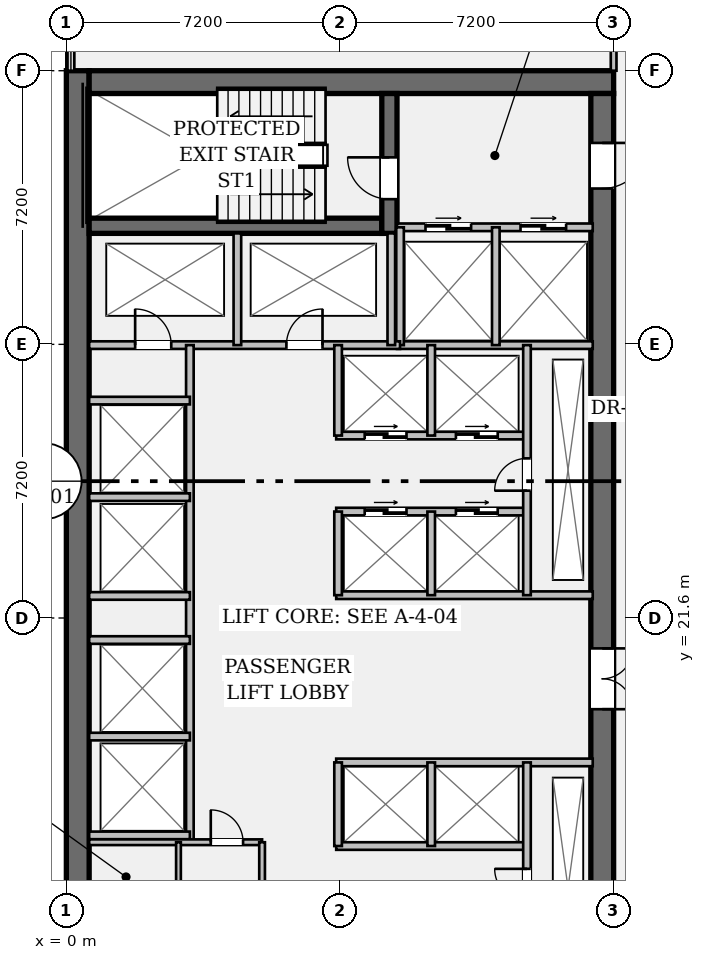
"""IFC4 building model, lengths in metres.
Left out: names, types, materials, properties, quantities, classifications, styles, units other than length and angle.
Written with IfcOpenShell. Run it as: python <this file> out.ifc"""

import sys

from ifc_helpers import new_model, si_unit, direction, frame, frame_2d, origin, place, context, subcontext, project, spatial, rectangle, extrude, element, fill, save


model = new_model("IFC4")
c1 = context("Model", 3, precision=1e-05, world=origin(), true_north=direction((0.0, 1.0)))
c2 = subcontext(c1, "Body", "Model", "MODEL_VIEW")
j1 = project(units=[si_unit("LENGTHUNIT", "METRE"), si_unit("PLANEANGLEUNIT", "RADIAN")], contexts=[c1])
p1 = place(None, origin())
s1 = spatial("IfcSite", under=j1, at=p1, CompositionType="ELEMENT")
p2 = place(p1, origin())
s2 = spatial("IfcBuilding", under=s1, at=p2, CompositionType="ELEMENT")
p3 = place(p2, frame((0.0, 0.0, 46.55)))
s3 = spatial("IfcBuildingStorey", under=s2, at=p3, CompositionType="ELEMENT", Elevation=46.55)
p4 = place(p3, frame((0.3, 7.2, 0.0), z_axis=(0.0, 0.0, 1.0), x_axis=(0.0, 1.0, 0.0)))
e1 = element("IfcWall", 1, at=p4, inside=s3, PredefinedType="SHEAR", context=c2, shape_type="SweptSolid", body=[
    extrude(rectangle(XDim=28.8, YDim=0.6, at=frame_2d((14.4, 0.0))), origin(), (0.0, 0.0, 1.0), 3.57),
])
p5 = place(p3, frame((0.6, 35.7, 0.0), z_axis=(0.0, 0.0, 1.0), x_axis=(1.0, 0.0, 0.0)))
e2 = element("IfcWall", 2, at=p5, inside=s3, PredefinedType="SHEAR", context=c2, shape_type="SweptSolid", body=[
    extrude(rectangle(XDim=13.8, YDim=0.6, at=frame_2d((6.9, 0.0))), origin(), (0.0, 0.0, 1.0), 3.57),
])
p6 = place(p3, frame((14.1, 35.4, 0.0), z_axis=(0.0, 0.0, 1.0), x_axis=(0.0, -1.0, 0.0)))
e3 = element("IfcWall", 3, at=p6, inside=s3, PredefinedType="SHEAR", context=c2, shape_type="SweptSolid", body=[
    extrude(rectangle(XDim=27.6, YDim=0.6, at=frame_2d((13.8, 0.0))), origin(), (0.0, 0.0, 1.0), 3.57),
])
p7 = place(p6, frame((1.3, 0.0, 0.0)))
e4 = element("IfcOpeningElement", 4, at=p7, cuts=e3, PredefinedType="OPENING", context=c2, shape_type="SweptSolid", body=[
    extrude(rectangle(XDim=1.2, YDim=2.15, at=frame_2d((0.6, 1.075))), frame((0.0, 0.312, 0.0), z_axis=(0.0, -1.0, 0.0), x_axis=(1.0, 0.0, 0.0)), (0.0, 0.0, 1.0), 0.624),
])
p8 = place(p6, frame((25.25, 0.0, 0.0)))
e5 = element("IfcOpeningElement", 5, at=p8, cuts=e3, PredefinedType="OPENING", context=c2, shape_type="SweptSolid", body=[
    extrude(rectangle(XDim=1.2, YDim=2.15, at=frame_2d((0.6, 1.075))), frame((0.0, 0.312, 0.0), z_axis=(0.0, -1.0, 0.0), x_axis=(1.0, 0.0, 0.0)), (0.0, 0.0, 1.0), 0.624),
])
p9 = place(p6, frame((14.6, 0.0, 0.0)))
e6 = element("IfcOpeningElement", 6, at=p9, cuts=e3, PredefinedType="OPENING", context=c2, shape_type="SweptSolid", body=[
    extrude(rectangle(XDim=1.6, YDim=2.2, at=frame_2d((0.8, 1.1))), frame((0.0, 0.312, 0.0), z_axis=(0.0, -1.0, 0.0), x_axis=(1.0, 0.0, 0.0)), (0.0, 0.0, 1.0), 0.624),
])
p10 = place(p3, frame((0.6, 31.92, 0.0), z_axis=(0.0, 0.0, 1.0), x_axis=(1.0, 0.0, 0.0)))
e7 = element("IfcWall", 7, at=p10, inside=s3, PredefinedType="SHEAR", context=c2, shape_type="SweptSolid", body=[
    extrude(rectangle(XDim=7.7, YDim=0.4, at=frame_2d((3.85, 0.0))), origin(), (0.0, 0.0, 1.0), 3.57),
])
p11 = place(p3, frame((8.5, 31.72, 0.0), z_axis=(0.0, 0.0, 1.0), x_axis=(0.0, 1.0, 0.0)))
e8 = element("IfcWall", 8, at=p11, inside=s3, PredefinedType="SHEAR", context=c2, shape_type="SweptSolid", body=[
    extrude(rectangle(XDim=3.68, YDim=0.4, at=frame_2d((1.84, 0.0))), origin(), (0.0, 0.0, 1.0), 3.57),
])
p12 = place(p11, frame((0.9, 0.0, 0.0)))
e9 = element("IfcOpeningElement", 9, at=p12, cuts=e8, PredefinedType="OPENING", context=c2, shape_type="SweptSolid", body=[
    extrude(rectangle(XDim=1.1, YDim=2.15, at=frame_2d((0.55, 1.075))), frame((0.0, 0.212, 0.0), z_axis=(0.0, -1.0, 0.0), x_axis=(1.0, 0.0, 0.0)), (0.0, 0.0, 1.0), 0.424),
])
p13 = place(p3, frame((8.7, 31.88, 0.0), z_axis=(0.0, 0.0, 1.0), x_axis=(1.0, 0.0, 0.0)))
e10 = element("IfcWall", 10, at=p13, inside=s3, PredefinedType="PARTITIONING", context=c2, shape_type="SweptSolid", body=[
    extrude(rectangle(XDim=5.15, YDim=0.2, at=frame_2d((2.575, 0.0))), origin(), (0.0, 0.0, 1.0), 3.57),
])
p14 = place(p13, frame((0.75, 0.0, 0.0)))
e11 = element("IfcOpeningElement", 11, at=p14, cuts=e10, PredefinedType="OPENING", context=c2, shape_type="SweptSolid", body=[
    extrude(rectangle(XDim=1.2, YDim=2.2, at=frame_2d((0.6, 1.1))), frame((0.0, 0.112, 0.0), z_axis=(0.0, -1.0, 0.0), x_axis=(1.0, 0.0, 0.0)), (0.0, 0.0, 1.0), 0.224),
])
p15 = place(p13, frame((3.25, 0.0, 0.0)))
e12 = element("IfcOpeningElement", 12, at=p15, cuts=e10, PredefinedType="OPENING", context=c2, shape_type="SweptSolid", body=[
    extrude(rectangle(XDim=1.2, YDim=2.2, at=frame_2d((0.6, 1.1))), frame((0.0, 0.112, 0.0), z_axis=(0.0, -1.0, 0.0), x_axis=(1.0, 0.0, 0.0)), (0.0, 0.0, 1.0), 0.224),
])
p16 = place(p3, frame((8.7, 28.78, 0.0), z_axis=(0.0, 0.0, 1.0), x_axis=(1.0, 0.0, 0.0)))
e13 = element("IfcWall", 13, at=p16, inside=s3, PredefinedType="PARTITIONING", context=c2, shape_type="SweptSolid", body=[
    extrude(rectangle(XDim=5.15, YDim=0.2, at=frame_2d((2.575, 0.0))), origin(), (0.0, 0.0, 1.0), 3.57),
])
for number, where, z_axis, x_axis in (
    (14, (8.78, 28.78, 0.0), (0.0, 0.0, 1.0), (0.0, 1.0, 0.0)),
    (15, (11.3, 28.78, 0.0), (0.0, 0.0, 1.0), (0.0, 1.0, 0.0)),
):
    element("IfcWall", number, at=place(p3, frame(where, z_axis=z_axis, x_axis=x_axis)), inside=s3, PredefinedType="PARTITIONING", context=c2, shape_type="SweptSolid", body=[
        extrude(rectangle(XDim=3.1, YDim=0.2, at=frame_2d((1.55, 0.0))), origin(), (0.0, 0.0, 1.0), 3.57),
    ])
p17 = place(p3, frame((0.6, 28.78, 0.0), z_axis=(0.0, 0.0, 1.0), x_axis=(1.0, 0.0, 0.0)))
e16 = element("IfcWall", 16, at=p17, inside=s3, PredefinedType="PARTITIONING", context=c2, shape_type="SweptSolid", body=[
    extrude(rectangle(XDim=8.18, YDim=0.2, at=frame_2d((4.09, 0.0))), origin(), (0.0, 0.0, 1.0), 3.57),
])
p18 = place(p17, frame((1.21, 0.0, 0.0)))
e17 = element("IfcOpeningElement", 17, at=p18, cuts=e16, PredefinedType="OPENING", context=c2, shape_type="SweptSolid", body=[
    extrude(rectangle(XDim=0.95, YDim=2.15, at=frame_2d((0.475, 1.075))), frame((0.0, 0.112, 0.0), z_axis=(0.0, -1.0, 0.0), x_axis=(1.0, 0.0, 0.0)), (0.0, 0.0, 1.0), 0.224),
])
p19 = place(p17, frame((5.19, 0.0, 0.0)))
e18 = element("IfcOpeningElement", 18, at=p19, cuts=e16, PredefinedType="OPENING", context=c2, shape_type="SweptSolid", body=[
    extrude(rectangle(XDim=0.95, YDim=2.15, at=frame_2d((0.475, 1.075))), frame((0.0, 0.112, 0.0), z_axis=(0.0, -1.0, 0.0), x_axis=(1.0, 0.0, 0.0)), (0.0, 0.0, 1.0), 0.224),
])
for number, where, z_axis, x_axis in (
    (19, (4.5, 28.78, 0.0), (0.0, 0.0, 1.0), (0.0, 1.0, 0.0)),
    (20, (8.55, 28.78, 0.0), (0.0, 0.0, 1.0), (0.0, 1.0, 0.0)),
):
    element("IfcWall", number, at=place(p3, frame(where, z_axis=z_axis, x_axis=x_axis)), inside=s3, PredefinedType="PARTITIONING", context=c2, shape_type="SweptSolid", body=[
        extrude(rectangle(XDim=2.94, YDim=0.2, at=frame_2d((1.47, 0.0))), origin(), (0.0, 0.0, 1.0), 3.57),
    ])
p20 = place(p3, frame((3.25, 15.7, 0.0), z_axis=(0.0, 0.0, 1.0), x_axis=(0.0, 1.0, 0.0)))
e21 = element("IfcWall", 21, at=p20, inside=s3, PredefinedType="PARTITIONING", context=c2, shape_type="SweptSolid", body=[
    extrude(rectangle(XDim=13.08, YDim=0.2, at=frame_2d((6.54, 0.0))), origin(), (0.0, 0.0, 1.0), 3.57),
])
for number, where, z_axis, x_axis in (
    (22, (0.6, 15.88, 0.0), (0.0, 0.0, 1.0), (1.0, 0.0, 0.0)),
    (23, (0.6, 18.48, 0.0), (0.0, 0.0, 1.0), (1.0, 0.0, 0.0)),
    (24, (0.6, 22.18, 0.0), (0.0, 0.0, 1.0), (1.0, 0.0, 0.0)),
    (25, (0.6, 24.78, 0.0), (0.0, 0.0, 1.0), (1.0, 0.0, 0.0)),
    (26, (0.6, 21.02, 0.0), (0.0, 0.0, 1.0), (1.0, 0.0, 0.0)),
    (27, (0.6, 27.32, 0.0), (0.0, 0.0, 1.0), (1.0, 0.0, 0.0)),
):
    element("IfcWall", number, at=place(p3, frame(where, z_axis=z_axis, x_axis=x_axis)), inside=s3, PredefinedType="PARTITIONING", context=c2, shape_type="SweptSolid", body=[
        extrude(rectangle(XDim=2.65, YDim=0.2, at=frame_2d((1.325, 0.0))), origin(), (0.0, 0.0, 1.0), 3.57),
    ])
p21 = place(p3, frame((7.1, 22.2, 0.0), z_axis=(0.0, 0.0, 1.0), x_axis=(1.0, 0.0, 0.0)))
e28 = element("IfcWall", 28, at=p21, inside=s3, PredefinedType="PARTITIONING", context=c2, shape_type="SweptSolid", body=[
    extrude(rectangle(XDim=6.75, YDim=0.2, at=frame_2d((3.375, 0.0))), origin(), (0.0, 0.0, 1.0), 3.57),
])
p22 = place(p3, frame((7.1, 24.4, 0.0), z_axis=(0.0, 0.0, 1.0), x_axis=(1.0, 0.0, 0.0)))
e29 = element("IfcWall", 29, at=p22, inside=s3, PredefinedType="PARTITIONING", context=c2, shape_type="SweptSolid", body=[
    extrude(rectangle(XDim=5.02, YDim=0.2, at=frame_2d((2.51, 0.0))), origin(), (0.0, 0.0, 1.0), 3.57),
])
p23 = place(p22, frame((0.75, 0.0, 0.0)))
e30 = element("IfcOpeningElement", 30, at=p23, cuts=e29, PredefinedType="OPENING", context=c2, shape_type="SweptSolid", body=[
    extrude(rectangle(XDim=1.1, YDim=2.2, at=frame_2d((0.55, 1.1))), frame((0.0, 0.112, 0.0), z_axis=(0.0, -1.0, 0.0), x_axis=(1.0, 0.0, 0.0)), (0.0, 0.0, 1.0), 0.224),
])
p24 = place(p22, frame((3.15, 0.0, 0.0)))
e31 = element("IfcOpeningElement", 31, at=p24, cuts=e29, PredefinedType="OPENING", context=c2, shape_type="SweptSolid", body=[
    extrude(rectangle(XDim=1.1, YDim=2.2, at=frame_2d((0.55, 1.1))), frame((0.0, 0.112, 0.0), z_axis=(0.0, -1.0, 0.0), x_axis=(1.0, 0.0, 0.0)), (0.0, 0.0, 1.0), 0.224),
])
p25 = place(p3, frame((7.1, 26.4, 0.0), z_axis=(0.0, 0.0, 1.0), x_axis=(1.0, 0.0, 0.0)))
e32 = element("IfcWall", 32, at=p25, inside=s3, PredefinedType="PARTITIONING", context=c2, shape_type="SweptSolid", body=[
    extrude(rectangle(XDim=5.02, YDim=0.2, at=frame_2d((2.51, 0.0))), origin(), (0.0, 0.0, 1.0), 3.57),
])
p26 = place(p25, frame((0.75, 0.0, 0.0)))
e33 = element("IfcOpeningElement", 33, at=p26, cuts=e32, PredefinedType="OPENING", context=c2, shape_type="SweptSolid", body=[
    extrude(rectangle(XDim=1.1, YDim=2.2, at=frame_2d((0.55, 1.1))), frame((0.0, 0.112, 0.0), z_axis=(0.0, -1.0, 0.0), x_axis=(1.0, 0.0, 0.0)), (0.0, 0.0, 1.0), 0.224),
])
p27 = place(p25, frame((3.15, 0.0, 0.0)))
e34 = element("IfcOpeningElement", 34, at=p27, cuts=e32, PredefinedType="OPENING", context=c2, shape_type="SweptSolid", body=[
    extrude(rectangle(XDim=1.1, YDim=2.2, at=frame_2d((0.55, 1.1))), frame((0.0, 0.112, 0.0), z_axis=(0.0, -1.0, 0.0), x_axis=(1.0, 0.0, 0.0)), (0.0, 0.0, 1.0), 0.224),
])
p28 = place(p3, frame((7.15, 22.2, 0.0), z_axis=(0.0, 0.0, 1.0), x_axis=(0.0, 1.0, 0.0)))
e35 = element("IfcWall", 35, at=p28, inside=s3, PredefinedType="PARTITIONING", context=c2, shape_type="SweptSolid", body=[
    extrude(rectangle(XDim=2.2, YDim=0.2, at=frame_2d((1.1, 0.0))), origin(), (0.0, 0.0, 1.0), 3.57),
])
p29 = place(p3, frame((7.15, 26.4, 0.0), z_axis=(0.0, 0.0, 1.0), x_axis=(0.0, 1.0, 0.0)))
e36 = element("IfcWall", 36, at=p29, inside=s3, PredefinedType="PARTITIONING", context=c2, shape_type="SweptSolid", body=[
    extrude(rectangle(XDim=2.38, YDim=0.2, at=frame_2d((1.19, 0.0))), origin(), (0.0, 0.0, 1.0), 3.57),
])
p30 = place(p3, frame((9.6, 22.2, 0.0), z_axis=(0.0, 0.0, 1.0), x_axis=(0.0, 1.0, 0.0)))
e37 = element("IfcWall", 37, at=p30, inside=s3, PredefinedType="PARTITIONING", context=c2, shape_type="SweptSolid", body=[
    extrude(rectangle(XDim=2.2, YDim=0.2, at=frame_2d((1.1, 0.0))), origin(), (0.0, 0.0, 1.0), 3.57),
])
p31 = place(p3, frame((9.6, 26.4, 0.0), z_axis=(0.0, 0.0, 1.0), x_axis=(0.0, 1.0, 0.0)))
e38 = element("IfcWall", 38, at=p31, inside=s3, PredefinedType="PARTITIONING", context=c2, shape_type="SweptSolid", body=[
    extrude(rectangle(XDim=2.38, YDim=0.2, at=frame_2d((1.19, 0.0))), origin(), (0.0, 0.0, 1.0), 3.57),
])
p32 = place(p3, frame((12.12, 22.2, 0.0), z_axis=(0.0, 0.0, 1.0), x_axis=(0.0, 1.0, 0.0)))
e39 = element("IfcWall", 39, at=p32, inside=s3, PredefinedType="PARTITIONING", context=c2, shape_type="SweptSolid", body=[
    extrude(rectangle(XDim=6.58, YDim=0.2, at=frame_2d((3.29, 0.0))), origin(), (0.0, 0.0, 1.0), 3.57),
])
p33 = place(p32, frame((2.75, 0.0, 0.0)))
e40 = element("IfcOpeningElement", 40, at=p33, cuts=e39, PredefinedType="OPENING", context=c2, shape_type="SweptSolid", body=[
    extrude(rectangle(XDim=0.85, YDim=2.15, at=frame_2d((0.425, 1.075))), frame((0.0, 0.112, 0.0), z_axis=(0.0, -1.0, 0.0), x_axis=(1.0, 0.0, 0.0)), (0.0, 0.0, 1.0), 0.224),
])
p34 = place(p3, frame((7.1, 17.8, 0.0), z_axis=(0.0, 0.0, 1.0), x_axis=(1.0, 0.0, 0.0)))
e41 = element("IfcWall", 41, at=p34, inside=s3, PredefinedType="PARTITIONING", context=c2, shape_type="SweptSolid", body=[
    extrude(rectangle(XDim=6.75, YDim=0.2, at=frame_2d((3.375, 0.0))), origin(), (0.0, 0.0, 1.0), 3.57),
])
p35 = place(p3, frame((7.1, 15.6, 0.0), z_axis=(0.0, 0.0, 1.0), x_axis=(1.0, 0.0, 0.0)))
e42 = element("IfcWall", 42, at=p35, inside=s3, PredefinedType="PARTITIONING", context=c2, shape_type="SweptSolid", body=[
    extrude(rectangle(XDim=5.02, YDim=0.2, at=frame_2d((2.51, 0.0))), origin(), (0.0, 0.0, 1.0), 3.57),
])
for number, where, z_axis, x_axis in (
    (43, (7.15, 15.6, 0.0), (0.0, 0.0, 1.0), (0.0, 1.0, 0.0)),
    (44, (9.6, 15.6, 0.0), (0.0, 0.0, 1.0), (0.0, 1.0, 0.0)),
):
    element("IfcWall", number, at=place(p3, frame(where, z_axis=z_axis, x_axis=x_axis)), inside=s3, PredefinedType="PARTITIONING", context=c2, shape_type="SweptSolid", body=[
        extrude(rectangle(XDim=2.2, YDim=0.2, at=frame_2d((1.1, 0.0))), origin(), (0.0, 0.0, 1.0), 3.57),
    ])
p36 = place(p3, frame((12.12, 11.2, 0.0), z_axis=(0.0, 0.0, 1.0), x_axis=(0.0, 1.0, 0.0)))
e45 = element("IfcWall", 45, at=p36, inside=s3, PredefinedType="PARTITIONING", context=c2, shape_type="SweptSolid", body=[
    extrude(rectangle(XDim=6.6, YDim=0.2, at=frame_2d((3.3, 0.0))), origin(), (0.0, 0.0, 1.0), 3.57),
])
p37 = place(p36, frame((2.95, 0.0, 0.0)))
e46 = element("IfcOpeningElement", 46, at=p37, cuts=e45, PredefinedType="OPENING", context=c2, shape_type="SweptSolid", body=[
    extrude(rectangle(XDim=0.85, YDim=2.15, at=frame_2d((0.425, 1.075))), frame((0.0, 0.112, 0.0), z_axis=(0.0, -1.0, 0.0), x_axis=(1.0, 0.0, 0.0)), (0.0, 0.0, 1.0), 0.224),
])
p38 = place(p3, frame((0.6, 15.7, 0.0), z_axis=(0.0, 0.0, 1.0), x_axis=(1.0, 0.0, 0.0)))
e47 = element("IfcWall", 47, at=p38, inside=s3, PredefinedType="PARTITIONING", context=c2, shape_type="SweptSolid", body=[
    extrude(rectangle(XDim=4.55, YDim=0.15, at=frame_2d((2.275, 0.0))), origin(), (0.0, 0.0, 1.0), 3.57),
])
p39 = place(p38, frame((3.2, 0.0, 0.0)))
e48 = element("IfcOpeningElement", 48, at=p39, cuts=e47, PredefinedType="OPENING", context=c2, shape_type="SweptSolid", body=[
    extrude(rectangle(XDim=0.85, YDim=2.15, at=frame_2d((0.425, 1.075))), frame((0.0, 0.087, 0.0), z_axis=(0.0, -1.0, 0.0), x_axis=(1.0, 0.0, 0.0)), (0.0, 0.0, 1.0), 0.174),
])
p40 = place(p3, frame((5.15, 11.28, 0.0), z_axis=(0.0, 0.0, 1.0), x_axis=(0.0, 1.0, 0.0)))
e49 = element("IfcWall", 49, at=p40, inside=s3, PredefinedType="PARTITIONING", context=c2, shape_type="SweptSolid", body=[
    extrude(rectangle(XDim=4.42, YDim=0.15, at=frame_2d((2.21, 0.0))), origin(), (0.0, 0.0, 1.0), 3.57),
])
p41 = place(p3, frame((2.95, 11.28, 0.0), z_axis=(0.0, 0.0, 1.0), x_axis=(0.0, 1.0, 0.0)))
e50 = element("IfcWall", 50, at=p41, inside=s3, PredefinedType="PARTITIONING", context=c2, shape_type="SweptSolid", body=[
    extrude(rectangle(XDim=4.42, YDim=0.125, at=frame_2d((2.21, 0.0))), origin(), (0.0, 0.0, 1.0), 3.57),
])
p42 = place(p41, frame((1.6, 0.0, 0.0)))
e51 = element("IfcOpeningElement", 51, at=p42, cuts=e50, PredefinedType="OPENING", context=c2, shape_type="SweptSolid", body=[
    extrude(rectangle(XDim=0.85, YDim=2.15, at=frame_2d((0.425, 1.075))), frame((0.0, 0.074, 0.0), z_axis=(0.0, -1.0, 0.0), x_axis=(1.0, 0.0, 0.0)), (0.0, 0.0, 1.0), 0.149),
])
p43 = place(p3, frame((14.4, 36.0, 0.0), z_axis=(0.0, 0.0, 1.0), x_axis=(0.0, 1.0, 0.0)))
e52 = element("IfcWall", 52, at=p43, inside=s3, PredefinedType="PARTITIONING", context=c2, shape_type="SweptSolid", body=[
    extrude(rectangle(XDim=7.08, YDim=0.15, at=frame_2d((3.54, 0.0))), origin(), (0.0, 0.0, 1.0), 2.699),
])
p44 = place(p43, frame((0.65, 0.0, 0.0)))
e53 = element("IfcOpeningElement", 53, at=p44, cuts=e52, PredefinedType="OPENING", context=c2, shape_type="SweptSolid", body=[
    extrude(rectangle(XDim=0.9, YDim=2.15, at=frame_2d((0.45, 1.075))), frame((0.0, 0.087, 0.0), z_axis=(0.0, -1.0, 0.0), x_axis=(1.0, 0.0, 0.0)), (0.0, 0.0, 1.0), 0.174),
])
p45 = place(p12, origin())
e54 = element("IfcDoor", 54, at=p45, inside=s3, OperationType="SINGLE_SWING_RIGHT", PredefinedType="DOOR", context=c2, shape_type="SweptSolid", body=[
    extrude(rectangle(XDim=1.1, YDim=2.15, at=frame_2d((0.55, 1.075))), frame((0.0, 0.025, 0.0), z_axis=(0.0, -1.0, 0.0), x_axis=(1.0, 0.0, 0.0)), (0.0, 0.0, 1.0), 0.05),
])
fill(e9, e54)
p46 = place(p7, origin())
e55 = element("IfcDoor", 55, at=p46, inside=s3, OperationType="SINGLE_SWING_LEFT", PredefinedType="DOOR", context=c2, shape_type="SweptSolid", body=[
    extrude(rectangle(XDim=1.2, YDim=2.15, at=frame_2d((0.6, 1.075))), frame((0.0, 0.025, 0.0), z_axis=(0.0, -1.0, 0.0), x_axis=(1.0, 0.0, 0.0)), (0.0, 0.0, 1.0), 0.05),
])
fill(e4, e55)
p47 = place(p14, origin())
e56 = element("IfcDoor", 56, at=p47, inside=s3, OperationType="DOUBLE_DOOR_SLIDING", PredefinedType="DOOR", context=c2, shape_type="SweptSolid", body=[
    extrude(rectangle(XDim=1.2, YDim=2.2, at=frame_2d((0.6, 1.1))), frame((0.0, 0.025, 0.0), z_axis=(0.0, -1.0, 0.0), x_axis=(1.0, 0.0, 0.0)), (0.0, 0.0, 1.0), 0.05),
])
fill(e11, e56)
p48 = place(p15, origin())
e57 = element("IfcDoor", 57, at=p48, inside=s3, OperationType="DOUBLE_DOOR_SLIDING", PredefinedType="DOOR", context=c2, shape_type="SweptSolid", body=[
    extrude(rectangle(XDim=1.2, YDim=2.2, at=frame_2d((0.6, 1.1))), frame((0.0, 0.025, 0.0), z_axis=(0.0, -1.0, 0.0), x_axis=(1.0, 0.0, 0.0)), (0.0, 0.0, 1.0), 0.05),
])
fill(e12, e57)
p49 = place(p18, origin())
e58 = element("IfcDoor", 58, at=p49, inside=s3, OperationType="SINGLE_SWING_LEFT", PredefinedType="DOOR", context=c2, shape_type="SweptSolid", body=[
    extrude(rectangle(XDim=0.95, YDim=2.15, at=frame_2d((0.475, 1.075))), frame((0.0, 0.025, 0.0), z_axis=(0.0, -1.0, 0.0), x_axis=(1.0, 0.0, 0.0)), (0.0, 0.0, 1.0), 0.05),
])
fill(e17, e58)
p50 = place(p19, origin())
e59 = element("IfcDoor", 59, at=p50, inside=s3, OperationType="SINGLE_SWING_RIGHT", PredefinedType="DOOR", context=c2, shape_type="SweptSolid", body=[
    extrude(rectangle(XDim=0.95, YDim=2.15, at=frame_2d((0.475, 1.075))), frame((0.0, 0.025, 0.0), z_axis=(0.0, -1.0, 0.0), x_axis=(1.0, 0.0, 0.0)), (0.0, 0.0, 1.0), 0.05),
])
fill(e18, e59)
p51 = place(p9, origin())
e60 = element("IfcDoor", 60, at=p51, inside=s3, OperationType="DOUBLE_DOOR_SINGLE_SWING", PredefinedType="DOOR", context=c2, shape_type="SweptSolid", body=[
    extrude(rectangle(XDim=1.6, YDim=2.2, at=frame_2d((0.8, 1.1))), frame((0.0, 0.025, 0.0), z_axis=(0.0, -1.0, 0.0), x_axis=(1.0, 0.0, 0.0)), (0.0, 0.0, 1.0), 0.05),
])
fill(e6, e60)
p52 = place(p33, origin())
e61 = element("IfcDoor", 61, at=p52, inside=s3, OperationType="SINGLE_SWING_LEFT", PredefinedType="DOOR", context=c2, shape_type="SweptSolid", body=[
    extrude(rectangle(XDim=0.85, YDim=2.15, at=frame_2d((0.425, 1.075))), frame((0.0, 0.025, 0.0), z_axis=(0.0, -1.0, 0.0), x_axis=(1.0, 0.0, 0.0)), (0.0, 0.0, 1.0), 0.05),
])
fill(e40, e61)
p53 = place(p23, origin())
e62 = element("IfcDoor", 62, at=p53, inside=s3, OperationType="DOUBLE_DOOR_SLIDING", PredefinedType="DOOR", context=c2, shape_type="SweptSolid", body=[
    extrude(rectangle(XDim=1.1, YDim=2.2, at=frame_2d((0.55, 1.1))), frame((0.0, 0.025, 0.0), z_axis=(0.0, -1.0, 0.0), x_axis=(1.0, 0.0, 0.0)), (0.0, 0.0, 1.0), 0.05),
])
fill(e30, e62)
p54 = place(p24, origin())
e63 = element("IfcDoor", 63, at=p54, inside=s3, OperationType="DOUBLE_DOOR_SLIDING", PredefinedType="DOOR", context=c2, shape_type="SweptSolid", body=[
    extrude(rectangle(XDim=1.1, YDim=2.2, at=frame_2d((0.55, 1.1))), frame((0.0, 0.025, 0.0), z_axis=(0.0, -1.0, 0.0), x_axis=(1.0, 0.0, 0.0)), (0.0, 0.0, 1.0), 0.05),
])
fill(e31, e63)
p55 = place(p26, origin())
e64 = element("IfcDoor", 64, at=p55, inside=s3, OperationType="DOUBLE_DOOR_SLIDING", PredefinedType="DOOR", context=c2, shape_type="SweptSolid", body=[
    extrude(rectangle(XDim=1.1, YDim=2.2, at=frame_2d((0.55, 1.1))), frame((0.0, 0.025, 0.0), z_axis=(0.0, -1.0, 0.0), x_axis=(1.0, 0.0, 0.0)), (0.0, 0.0, 1.0), 0.05),
])
fill(e33, e64)
p56 = place(p27, origin())
e65 = element("IfcDoor", 65, at=p56, inside=s3, OperationType="DOUBLE_DOOR_SLIDING", PredefinedType="DOOR", context=c2, shape_type="SweptSolid", body=[
    extrude(rectangle(XDim=1.1, YDim=2.2, at=frame_2d((0.55, 1.1))), frame((0.0, 0.025, 0.0), z_axis=(0.0, -1.0, 0.0), x_axis=(1.0, 0.0, 0.0)), (0.0, 0.0, 1.0), 0.05),
])
fill(e34, e65)
p57 = place(p37, origin())
e66 = element("IfcDoor", 66, at=p57, inside=s3, OperationType="SINGLE_SWING_RIGHT", PredefinedType="DOOR", context=c2, shape_type="SweptSolid", body=[
    extrude(rectangle(XDim=0.85, YDim=2.15, at=frame_2d((0.425, 1.075))), frame((0.0, 0.025, 0.0), z_axis=(0.0, -1.0, 0.0), x_axis=(1.0, 0.0, 0.0)), (0.0, 0.0, 1.0), 0.05),
])
fill(e46, e66)
p58 = place(p39, origin())
e67 = element("IfcDoor", 67, at=p58, inside=s3, OperationType="SINGLE_SWING_LEFT", PredefinedType="DOOR", context=c2, shape_type="SweptSolid", body=[
    extrude(rectangle(XDim=0.85, YDim=2.15, at=frame_2d((0.425, 1.075))), frame((0.0, 0.025, 0.0), z_axis=(0.0, -1.0, 0.0), x_axis=(1.0, 0.0, 0.0)), (0.0, 0.0, 1.0), 0.05),
])
fill(e48, e67)
save(model, sys.argv[1])
